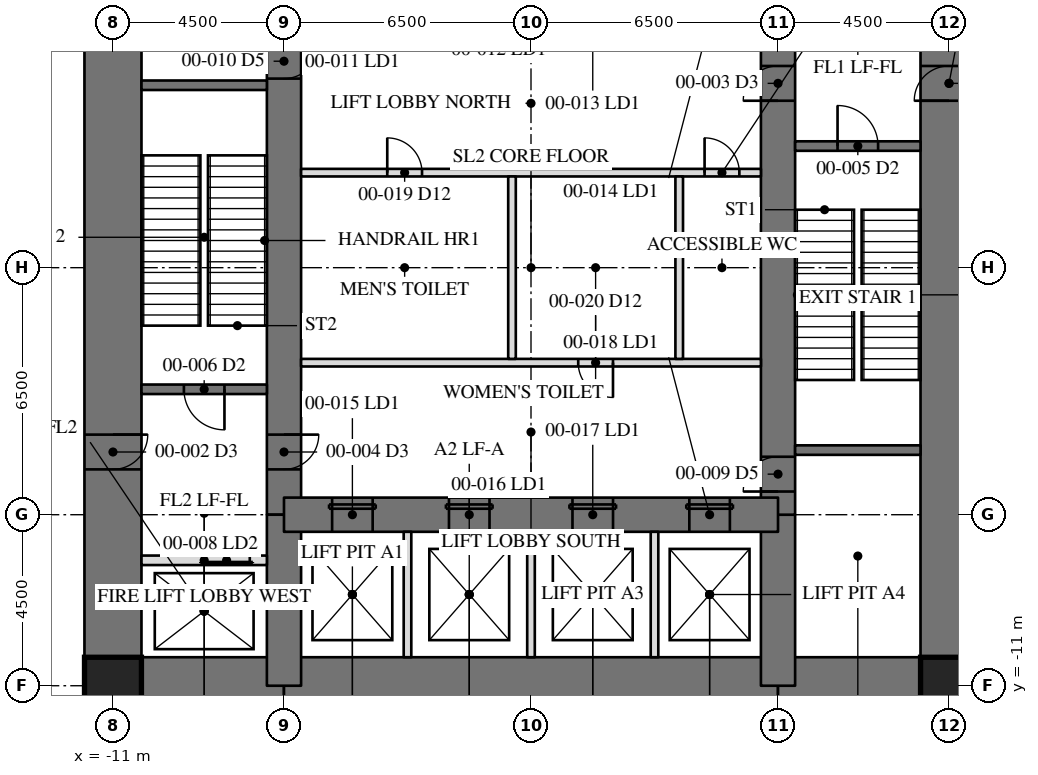
"""IFC4 building model, lengths in metres.
Left out: names, types, materials, properties, quantities, classifications, styles, units other than length and angle.
Written with IfcOpenShell. Run it as: python <this file> out.ifc"""

import sys

from ifc_helpers import new_model, si_unit, direction, frame, frame_2d, origin, origin_2d, place, context, subcontext, project, spatial, rectangle, hollow_rectangle, extrude, element, fill, save


model = new_model("IFC4")
c1 = context("Model", 3, precision=1e-05, world=origin(), true_north=direction((0.0, 1.0)))
c2 = subcontext(c1, "Body", "Model", "MODEL_VIEW")
j1 = project(units=[si_unit("LENGTHUNIT", "METRE"), si_unit("PLANEANGLEUNIT", "RADIAN")], contexts=[c1])
p1 = place(None, origin())
s1 = spatial("IfcSite", under=j1, at=p1, CompositionType="ELEMENT")
p2 = place(p1, origin())
s2 = spatial("IfcBuilding", under=s1, at=p2, CompositionType="ELEMENT")
p3 = place(p2, origin())
s3 = spatial("IfcBuildingStorey", under=s2, at=p3, CompositionType="ELEMENT", Elevation=0.0)
p4 = place(p3, frame((11.0, -11.0, -0.3), z_axis=(0.0, 0.0, 1.0), x_axis=(0.0, 1.0, 0.0)))
e1 = element("IfcWall", 1, at=p4, inside=s3, PredefinedType="SHEAR", context=c2, shape_type="SweptSolid", body=[
    extrude(rectangle(XDim=22.0, YDim=1.5, at=frame_2d((11.0, 0.0))), origin(), (0.0, 0.0, 1.0), 6.3),
])
p5 = place(p4, frame((15.393, 0.0, 0.3)))
e2 = element("IfcOpeningElement", 2, at=p5, cuts=e1, PredefinedType="OPENING", context=c2, shape_type="SweptSolid", body=[
    extrude(rectangle(XDim=0.915, YDim=2.134, at=frame_2d((0.458, 1.067))), frame((0.0, 0.76, 0.0), z_axis=(0.0, -1.0, 0.0), x_axis=(1.0, 0.0, 0.0)), (0.0, 0.0, 1.0), 1.52),
])
p6 = place(p3, frame((-11.0, 11.0, -0.3), z_axis=(0.0, 0.0, 1.0), x_axis=(0.0, -1.0, 0.0)))
e3 = element("IfcWall", 3, at=p6, inside=s3, PredefinedType="SHEAR", context=c2, shape_type="SweptSolid", body=[
    extrude(rectangle(XDim=22.0, YDim=1.5, at=frame_2d((11.0, 0.0))), origin(), (0.0, 0.0, 1.0), 6.3),
])
p7 = place(p6, frame((15.393, 0.0, 0.3)))
e4 = element("IfcOpeningElement", 4, at=p7, cuts=e3, PredefinedType="OPENING", context=c2, shape_type="SweptSolid", body=[
    extrude(rectangle(XDim=0.915, YDim=2.134, at=frame_2d((0.458, 1.067))), frame((0.0, 0.76, 0.0), z_axis=(0.0, -1.0, 0.0), x_axis=(1.0, 0.0, 0.0)), (0.0, 0.0, 1.0), 1.52),
])
p8 = place(p3, frame((-11.0, -11.0, -0.3), z_axis=(0.0, 0.0, 1.0), x_axis=(1.0, 0.0, 0.0)))
e5 = element("IfcWall", 5, at=p8, inside=s3, PredefinedType="SHEAR", context=c2, shape_type="SweptSolid", body=[
    extrude(rectangle(XDim=4.5, YDim=1.5, at=frame_2d((2.25, 0.0))), origin(), (0.0, 0.0, 1.0), 6.3),
])
p9 = place(p3, frame((-6.5, -11.0, -0.3), z_axis=(0.0, 0.0, 1.0), x_axis=(1.0, 0.0, 0.0)))
e6 = element("IfcWall", 6, at=p9, inside=s3, PredefinedType="SHEAR", context=c2, shape_type="SweptSolid", body=[
    extrude(rectangle(XDim=13.0, YDim=1.5, at=frame_2d((6.5, 0.0))), origin(), (0.0, 0.0, 1.0), 6.3),
])
p10 = place(p3, frame((6.5, -11.0, -0.3), z_axis=(0.0, 0.0, 1.0), x_axis=(1.0, 0.0, 0.0)))
e7 = element("IfcWall", 7, at=p10, inside=s3, PredefinedType="SHEAR", context=c2, shape_type="SweptSolid", body=[
    extrude(rectangle(XDim=4.5, YDim=1.5, at=frame_2d((2.25, 0.0))), origin(), (0.0, 0.0, 1.0), 6.3),
])
p11 = place(p3, frame((6.5, -11.0, -0.3), z_axis=(0.0, 0.0, 1.0), x_axis=(0.0, 1.0, 0.0)))
e8 = element("IfcWall", 8, at=p11, inside=s3, PredefinedType="SHEAR", context=c2, shape_type="SweptSolid", body=[
    extrude(rectangle(XDim=4.5, YDim=0.9, at=frame_2d((2.25, 0.0))), origin(), (0.0, 0.0, 1.0), 6.3),
])
p12 = place(p3, frame((6.5, -6.5, -0.3), z_axis=(0.0, 0.0, 1.0), x_axis=(0.0, 1.0, 0.0)))
e9 = element("IfcWall", 9, at=p12, inside=s3, PredefinedType="SHEAR", context=c2, shape_type="SweptSolid", body=[
    extrude(rectangle(XDim=13.0, YDim=0.9, at=frame_2d((6.5, 0.0))), origin(), (0.0, 0.0, 1.0), 6.3),
])
p13 = place(p12, frame((10.893, 0.0, 0.3)))
e10 = element("IfcOpeningElement", 10, at=p13, cuts=e9, PredefinedType="OPENING", context=c2, shape_type="SweptSolid", body=[
    extrude(rectangle(XDim=0.915, YDim=2.134, at=frame_2d((0.458, 1.067))), frame((0.0, 0.46, 0.0), z_axis=(0.0, -1.0, 0.0), x_axis=(1.0, 0.0, 0.0)), (0.0, 0.0, 1.0), 0.92),
])
p14 = place(p12, frame((0.61, 0.0, 0.3)))
e11 = element("IfcOpeningElement", 11, at=p14, cuts=e9, PredefinedType="OPENING", context=c2, shape_type="SweptSolid", body=[
    extrude(rectangle(XDim=0.915, YDim=2.134, at=frame_2d((0.458, 1.067))), frame((0.0, 0.46, 0.0), z_axis=(0.0, -1.0, 0.0), x_axis=(1.0, 0.0, 0.0)), (0.0, 0.0, 1.0), 0.92),
])
p15 = place(p3, frame((-6.5, 6.5, -0.3), z_axis=(0.0, 0.0, 1.0), x_axis=(0.0, -1.0, 0.0)))
e12 = element("IfcWall", 12, at=p15, inside=s3, PredefinedType="SHEAR", context=c2, shape_type="SweptSolid", body=[
    extrude(rectangle(XDim=13.0, YDim=0.9, at=frame_2d((6.5, 0.0))), origin(), (0.0, 0.0, 1.0), 6.3),
])
p16 = place(p15, frame((10.893, 0.0, 0.3)))
e13 = element("IfcOpeningElement", 13, at=p16, cuts=e12, PredefinedType="OPENING", context=c2, shape_type="SweptSolid", body=[
    extrude(rectangle(XDim=0.915, YDim=2.134, at=frame_2d((0.458, 1.067))), frame((0.0, 0.46, 0.0), z_axis=(0.0, -1.0, 0.0), x_axis=(1.0, 0.0, 0.0)), (0.0, 0.0, 1.0), 0.92),
])
p17 = place(p15, frame((0.61, 0.0, 0.3)))
e14 = element("IfcOpeningElement", 14, at=p17, cuts=e12, PredefinedType="OPENING", context=c2, shape_type="SweptSolid", body=[
    extrude(rectangle(XDim=0.915, YDim=2.134, at=frame_2d((0.458, 1.067))), frame((0.0, 0.46, 0.0), z_axis=(0.0, -1.0, 0.0), x_axis=(1.0, 0.0, 0.0)), (0.0, 0.0, 1.0), 0.92),
])
p18 = place(p3, frame((-6.5, -6.5, -0.3), z_axis=(0.0, 0.0, 1.0), x_axis=(0.0, -1.0, 0.0)))
e15 = element("IfcWall", 15, at=p18, inside=s3, PredefinedType="SHEAR", context=c2, shape_type="SweptSolid", body=[
    extrude(rectangle(XDim=4.5, YDim=0.9, at=frame_2d((2.25, 0.0))), origin(), (0.0, 0.0, 1.0), 6.3),
])
p19 = place(p3, frame((-6.5, -6.5, -0.3), z_axis=(0.0, 0.0, 1.0), x_axis=(1.0, 0.0, 0.0)))
e16 = element("IfcWall", 16, at=p19, inside=s3, PredefinedType="SHEAR", context=c2, shape_type="SweptSolid", body=[
    extrude(rectangle(XDim=13.0, YDim=0.9, at=frame_2d((6.5, 0.0))), origin(), (0.0, 0.0, 1.0), 6.3),
])
p20 = place(p19, frame((1.267, 0.0, 0.3)))
e17 = element("IfcOpeningElement", 17, at=p20, cuts=e16, PredefinedType="OPENING", context=c2, shape_type="SweptSolid", body=[
    extrude(rectangle(XDim=1.067, YDim=2.134, at=frame_2d((0.533, 1.067))), frame((0.0, 0.46, 0.0), z_axis=(0.0, -1.0, 0.0), x_axis=(1.0, 0.0, 0.0)), (0.0, 0.0, 1.0), 0.92),
])
p21 = place(p19, frame((4.342, 0.0, 0.3)))
e18 = element("IfcOpeningElement", 18, at=p21, cuts=e16, PredefinedType="OPENING", context=c2, shape_type="SweptSolid", body=[
    extrude(rectangle(XDim=1.067, YDim=2.134, at=frame_2d((0.533, 1.067))), frame((0.0, 0.46, 0.0), z_axis=(0.0, -1.0, 0.0), x_axis=(1.0, 0.0, 0.0)), (0.0, 0.0, 1.0), 0.92),
])
p22 = place(p19, frame((7.592, 0.0, 0.3)))
e19 = element("IfcOpeningElement", 19, at=p22, cuts=e16, PredefinedType="OPENING", context=c2, shape_type="SweptSolid", body=[
    extrude(rectangle(XDim=1.067, YDim=2.134, at=frame_2d((0.533, 1.067))), frame((0.0, 0.46, 0.0), z_axis=(0.0, -1.0, 0.0), x_axis=(1.0, 0.0, 0.0)), (0.0, 0.0, 1.0), 0.92),
])
p23 = place(p19, frame((10.667, 0.0, 0.3)))
e20 = element("IfcOpeningElement", 20, at=p23, cuts=e16, PredefinedType="OPENING", context=c2, shape_type="SweptSolid", body=[
    extrude(rectangle(XDim=1.067, YDim=2.134, at=frame_2d((0.533, 1.067))), frame((0.0, 0.46, 0.0), z_axis=(0.0, -1.0, 0.0), x_axis=(1.0, 0.0, 0.0)), (0.0, 0.0, 1.0), 0.92),
])
for number, where, z_axis, x_axis in (
    (21, (-11.0, -11.0, -0.3), (0.0, 0.0, 1.0), (1.0, 0.0, 0.0)),
    (22, (11.0, -11.0, -0.3), (0.0, 0.0, 1.0), (1.0, 0.0, 0.0)),
):
    element("IfcColumn", number, at=place(p3, frame(where, z_axis=z_axis, x_axis=x_axis)), inside=s3, PredefinedType="COLUMN", context=c2, shape_type="SweptSolid", body=[
        extrude(hollow_rectangle(XDim=1.499, YDim=1.499, WallThickness=0.102, at=origin_2d()), origin(), (0.0, 0.0, 1.0), 6.3),
    ])
for number, where, z_axis, x_axis in (
    (23, (6.95, -4.8, 0.0), (0.0, 0.0, 1.0), (1.0, 0.0, 0.0)),
    (24, (-6.95, 4.8, 0.0), (0.0, 0.0, 1.0), (-1.0, 0.0, 0.0)),
):
    element("IfcWall", number, at=place(p3, frame(where, z_axis=z_axis, x_axis=x_axis)), inside=s3, PredefinedType="SOLIDWALL", context=c2, shape_type="SweptSolid", body=[
        extrude(rectangle(XDim=3.3, YDim=0.25, at=frame_2d((1.65, 0.0))), origin(), (0.0, 0.0, 1.0), 5.81),
    ])
p24 = place(p3, frame((6.95, 3.2, 0.0), z_axis=(0.0, 0.0, 1.0), x_axis=(1.0, 0.0, 0.0)))
e25 = element("IfcWall", 25, at=p24, inside=s3, PredefinedType="SOLIDWALL", context=c2, shape_type="SweptSolid", body=[
    extrude(rectangle(XDim=3.3, YDim=0.25, at=frame_2d((1.65, 0.0))), origin(), (0.0, 0.0, 1.0), 5.81),
])
p25 = place(p24, frame((1.116, 0.0, 0.3)))
e26 = element("IfcOpeningElement", 26, at=p25, cuts=e25, PredefinedType="OPENING", context=c2, shape_type="SweptSolid", body=[
    extrude(rectangle(XDim=1.067, YDim=2.134, at=frame_2d((0.533, 1.067))), frame((0.0, 0.135, 0.0), z_axis=(0.0, -1.0, 0.0), x_axis=(1.0, 0.0, 0.0)), (0.0, 0.0, 1.0), 0.27),
])
p26 = place(p3, frame((-6.95, -3.2, 0.0), z_axis=(0.0, 0.0, 1.0), x_axis=(-1.0, 0.0, 0.0)))
e27 = element("IfcWall", 27, at=p26, inside=s3, PredefinedType="SOLIDWALL", context=c2, shape_type="SweptSolid", body=[
    extrude(rectangle(XDim=3.3, YDim=0.25, at=frame_2d((1.65, 0.0))), origin(), (0.0, 0.0, 1.0), 5.81),
])
p27 = place(p26, frame((1.116, 0.0, 0.3)))
e28 = element("IfcOpeningElement", 28, at=p27, cuts=e27, PredefinedType="OPENING", context=c2, shape_type="SweptSolid", body=[
    extrude(rectangle(XDim=1.067, YDim=2.134, at=frame_2d((0.533, 1.067))), frame((0.0, 0.135, 0.0), z_axis=(0.0, -1.0, 0.0), x_axis=(1.0, 0.0, 0.0)), (0.0, 0.0, 1.0), 0.27),
])
p28 = place(p3, frame((-6.95, -7.7, 0.0), z_axis=(0.0, 0.0, 1.0), x_axis=(-1.0, 0.0, 0.0)))
e29 = element("IfcWall", 29, at=p28, inside=s3, PredefinedType="PARTITIONING", context=c2, shape_type="SweptSolid", body=[
    extrude(rectangle(XDim=3.3, YDim=0.25, at=frame_2d((1.65, 0.0))), origin(), (0.0, 0.0, 1.0), 5.81),
])
p29 = place(p28, frame((0.45, 0.0, 0.3)))
e30 = element("IfcOpeningElement", 30, at=p29, cuts=e29, PredefinedType="OPENING", context=c2, shape_type="SweptSolid", body=[
    extrude(rectangle(XDim=1.219, YDim=2.134, at=frame_2d((0.609, 1.067))), frame((0.0, 0.135, 0.0), z_axis=(0.0, -1.0, 0.0), x_axis=(1.0, 0.0, 0.0)), (0.0, 0.0, 1.0), 0.27),
])
p30 = place(p3, frame((-6.05, 2.5, 0.0), z_axis=(0.0, 0.0, 1.0), x_axis=(1.0, 0.0, 0.0)))
e31 = element("IfcWall", 31, at=p30, inside=s3, PredefinedType="PARTITIONING", context=c2, shape_type="SweptSolid", body=[
    extrude(rectangle(XDim=12.1, YDim=0.2, at=frame_2d((6.05, 0.0))), origin(), (0.0, 0.0, 1.0), 5.81),
])
p31 = place(p30, frame((2.268, 0.0, 0.3)))
e32 = element("IfcOpeningElement", 32, at=p31, cuts=e31, PredefinedType="OPENING", context=c2, shape_type="SweptSolid", body=[
    extrude(rectangle(XDim=0.915, YDim=2.134, at=frame_2d((0.458, 1.067))), frame((0.0, 0.11, 0.0), z_axis=(0.0, -1.0, 0.0), x_axis=(1.0, 0.0, 0.0)), (0.0, 0.0, 1.0), 0.22),
])
p32 = place(p30, frame((10.617, 0.0, 0.3)))
e33 = element("IfcOpeningElement", 33, at=p32, cuts=e31, PredefinedType="OPENING", context=c2, shape_type="SweptSolid", body=[
    extrude(rectangle(XDim=0.915, YDim=2.134, at=frame_2d((0.458, 1.067))), frame((0.0, 0.11, 0.0), z_axis=(0.0, -1.0, 0.0), x_axis=(1.0, 0.0, 0.0)), (0.0, 0.0, 1.0), 0.22),
])
p33 = place(p3, frame((6.05, -2.5, 0.0), z_axis=(0.0, 0.0, 1.0), x_axis=(-1.0, 0.0, 0.0)))
e34 = element("IfcWall", 34, at=p33, inside=s3, PredefinedType="PARTITIONING", context=c2, shape_type="SweptSolid", body=[
    extrude(rectangle(XDim=12.1, YDim=0.2, at=frame_2d((6.05, 0.0))), origin(), (0.0, 0.0, 1.0), 5.81),
])
p34 = place(p33, frame((3.893, 0.0, 0.3)))
e35 = element("IfcOpeningElement", 35, at=p34, cuts=e34, PredefinedType="OPENING", context=c2, shape_type="SweptSolid", body=[
    extrude(rectangle(XDim=0.915, YDim=2.134, at=frame_2d((0.458, 1.067))), frame((0.0, 0.11, 0.0), z_axis=(0.0, -1.0, 0.0), x_axis=(1.0, 0.0, 0.0)), (0.0, 0.0, 1.0), 0.22),
])
for number, where, z_axis, x_axis in (
    (36, (-3.25, -10.25, 0.0), (0.0, 0.0, 1.0), (0.0, 1.0, 0.0)),
    (37, (0.0, -10.25, 0.0), (0.0, 0.0, 1.0), (0.0, 1.0, 0.0)),
    (38, (3.25, -10.25, 0.0), (0.0, 0.0, 1.0), (0.0, 1.0, 0.0)),
):
    element("IfcWall", number, at=place(p3, frame(where, z_axis=z_axis, x_axis=x_axis)), inside=s3, PredefinedType="PARTITIONING", context=c2, shape_type="SweptSolid", body=[
        extrude(rectangle(XDim=3.3, YDim=0.2, at=frame_2d((1.65, 0.0))), origin(), (0.0, 0.0, 1.0), 5.81),
    ])
for number, where, z_axis, x_axis in (
    (39, (-0.5, -2.4, 0.0), (0.0, 0.0, 1.0), (0.0, 1.0, 0.0)),
    (40, (3.9, -2.4, 0.0), (0.0, 0.0, 1.0), (0.0, 1.0, 0.0)),
):
    element("IfcWall", number, at=place(p3, frame(where, z_axis=z_axis, x_axis=x_axis)), inside=s3, PredefinedType="PARTITIONING", context=c2, shape_type="SweptSolid", body=[
        extrude(rectangle(XDim=4.8, YDim=0.2, at=frame_2d((2.4, 0.0))), origin(), (0.0, 0.0, 1.0), 5.81),
    ])
p35 = place(p7, origin())
e41 = element("IfcDoor", 41, at=p35, inside=s3, OperationType="SINGLE_SWING_RIGHT", PredefinedType="DOOR", context=c2, shape_type="SweptSolid", body=[
    extrude(rectangle(XDim=0.915, YDim=2.134, at=frame_2d((0.458, 1.067))), frame((0.0, -0.675, 0.0), z_axis=(0.0, -1.0, 0.0), x_axis=(1.0, 0.0, 0.0)), (0.0, 0.0, 1.0), 0.05),
])
fill(e4, e41)
p36 = place(p13, origin())
e42 = element("IfcDoor", 42, at=p36, inside=s3, OperationType="SINGLE_SWING_RIGHT", PredefinedType="DOOR", context=c2, shape_type="SweptSolid", body=[
    extrude(rectangle(XDim=0.915, YDim=2.134, at=frame_2d((0.458, 1.067))), frame((0.0, -0.375, 0.0), z_axis=(0.0, -1.0, 0.0), x_axis=(1.0, 0.0, 0.0)), (0.0, 0.0, 1.0), 0.05),
])
fill(e10, e42)
p37 = place(p16, origin())
e43 = element("IfcDoor", 43, at=p37, inside=s3, OperationType="SINGLE_SWING_RIGHT", PredefinedType="DOOR", context=c2, shape_type="SweptSolid", body=[
    extrude(rectangle(XDim=0.915, YDim=2.134, at=frame_2d((0.458, 1.067))), frame((0.0, -0.375, 0.0), z_axis=(0.0, -1.0, 0.0), x_axis=(1.0, 0.0, 0.0)), (0.0, 0.0, 1.0), 0.05),
])
fill(e13, e43)
p38 = place(p25, origin())
e44 = element("IfcDoor", 44, at=p38, inside=s3, OperationType="SINGLE_SWING_LEFT", PredefinedType="DOOR", context=c2, shape_type="SweptSolid", body=[
    extrude(rectangle(XDim=1.067, YDim=2.134, at=frame_2d((0.533, 1.067))), frame((0.0, 0.025, 0.0), z_axis=(0.0, -1.0, 0.0), x_axis=(1.0, 0.0, 0.0)), (0.0, 0.0, 1.0), 0.05),
])
fill(e26, e44)
p39 = place(p27, origin())
e45 = element("IfcDoor", 45, at=p39, inside=s3, OperationType="SINGLE_SWING_LEFT", PredefinedType="DOOR", context=c2, shape_type="SweptSolid", body=[
    extrude(rectangle(XDim=1.067, YDim=2.134, at=frame_2d((0.533, 1.067))), frame((0.0, 0.025, 0.0), z_axis=(0.0, -1.0, 0.0), x_axis=(1.0, 0.0, 0.0)), (0.0, 0.0, 1.0), 0.05),
])
fill(e28, e45)
p40 = place(p29, origin())
e46 = element("IfcDoor", 46, at=p40, inside=s3, OperationType="SLIDING_TO_LEFT", PredefinedType="DOOR", context=c2, shape_type="SweptSolid", body=[
    extrude(rectangle(XDim=1.219, YDim=2.134, at=frame_2d((0.609, 1.067))), frame((0.0, 0.025, 0.0), z_axis=(0.0, -1.0, 0.0), x_axis=(1.0, 0.0, 0.0)), (0.0, 0.0, 1.0), 0.05),
])
fill(e30, e46)
p41 = place(p14, origin())
e47 = element("IfcDoor", 47, at=p41, inside=s3, OperationType="SINGLE_SWING_RIGHT", PredefinedType="DOOR", context=c2, shape_type="SweptSolid", body=[
    extrude(rectangle(XDim=0.915, YDim=2.134, at=frame_2d((0.458, 1.067))), frame((0.0, -0.375, 0.0), z_axis=(0.0, -1.0, 0.0), x_axis=(1.0, 0.0, 0.0)), (0.0, 0.0, 1.0), 0.05),
])
fill(e11, e47)
p42 = place(p17, origin())
e48 = element("IfcDoor", 48, at=p42, inside=s3, OperationType="SINGLE_SWING_RIGHT", PredefinedType="DOOR", context=c2, shape_type="SweptSolid", body=[
    extrude(rectangle(XDim=0.915, YDim=2.134, at=frame_2d((0.458, 1.067))), frame((0.0, -0.375, 0.0), z_axis=(0.0, -1.0, 0.0), x_axis=(1.0, 0.0, 0.0)), (0.0, 0.0, 1.0), 0.05),
])
fill(e14, e48)
p43 = place(p20, origin())
e49 = element("IfcDoor", 49, at=p43, inside=s3, OperationType="SLIDING_TO_LEFT", PredefinedType="DOOR", context=c2, shape_type="SweptSolid", body=[
    extrude(rectangle(XDim=1.067, YDim=2.134, at=frame_2d((0.533, 1.067))), frame((0.0, -0.375, 0.0), z_axis=(0.0, -1.0, 0.0), x_axis=(1.0, 0.0, 0.0)), (0.0, 0.0, 1.0), 0.05),
])
fill(e17, e49)
p44 = place(p21, origin())
e50 = element("IfcDoor", 50, at=p44, inside=s3, OperationType="SLIDING_TO_LEFT", PredefinedType="DOOR", context=c2, shape_type="SweptSolid", body=[
    extrude(rectangle(XDim=1.067, YDim=2.134, at=frame_2d((0.533, 1.067))), frame((0.0, -0.375, 0.0), z_axis=(0.0, -1.0, 0.0), x_axis=(1.0, 0.0, 0.0)), (0.0, 0.0, 1.0), 0.05),
])
fill(e18, e50)
p45 = place(p22, origin())
e51 = element("IfcDoor", 51, at=p45, inside=s3, OperationType="SLIDING_TO_LEFT", PredefinedType="DOOR", context=c2, shape_type="SweptSolid", body=[
    extrude(rectangle(XDim=1.067, YDim=2.134, at=frame_2d((0.533, 1.067))), frame((0.0, -0.375, 0.0), z_axis=(0.0, -1.0, 0.0), x_axis=(1.0, 0.0, 0.0)), (0.0, 0.0, 1.0), 0.05),
])
fill(e19, e51)
p46 = place(p23, origin())
e52 = element("IfcDoor", 52, at=p46, inside=s3, OperationType="SLIDING_TO_LEFT", PredefinedType="DOOR", context=c2, shape_type="SweptSolid", body=[
    extrude(rectangle(XDim=1.067, YDim=2.134, at=frame_2d((0.533, 1.067))), frame((0.0, -0.375, 0.0), z_axis=(0.0, -1.0, 0.0), x_axis=(1.0, 0.0, 0.0)), (0.0, 0.0, 1.0), 0.05),
])
fill(e20, e52)
p47 = place(p31, origin())
e53 = element("IfcDoor", 53, at=p47, inside=s3, OperationType="SINGLE_SWING_LEFT", PredefinedType="DOOR", context=c2, shape_type="SweptSolid", body=[
    extrude(rectangle(XDim=0.915, YDim=2.134, at=frame_2d((0.458, 1.067))), frame((0.0, 0.025, 0.0), z_axis=(0.0, -1.0, 0.0), x_axis=(1.0, 0.0, 0.0)), (0.0, 0.0, 1.0), 0.05),
])
fill(e32, e53)
p48 = place(p34, origin())
e54 = element("IfcDoor", 54, at=p48, inside=s3, OperationType="SINGLE_SWING_LEFT", PredefinedType="DOOR", context=c2, shape_type="SweptSolid", body=[
    extrude(rectangle(XDim=0.915, YDim=2.134, at=frame_2d((0.458, 1.067))), frame((0.0, 0.025, 0.0), z_axis=(0.0, -1.0, 0.0), x_axis=(1.0, 0.0, 0.0)), (0.0, 0.0, 1.0), 0.05),
])
fill(e35, e54)
p49 = place(p32, origin())
e55 = element("IfcDoor", 55, at=p49, inside=s3, OperationType="SINGLE_SWING_LEFT", PredefinedType="DOOR", context=c2, shape_type="SweptSolid", body=[
    extrude(rectangle(XDim=0.915, YDim=2.134, at=frame_2d((0.458, 1.067))), frame((0.0, 0.025, 0.0), z_axis=(0.0, -1.0, 0.0), x_axis=(1.0, 0.0, 0.0)), (0.0, 0.0, 1.0), 0.05),
])
fill(e33, e55)
save(model, sys.argv[1])
